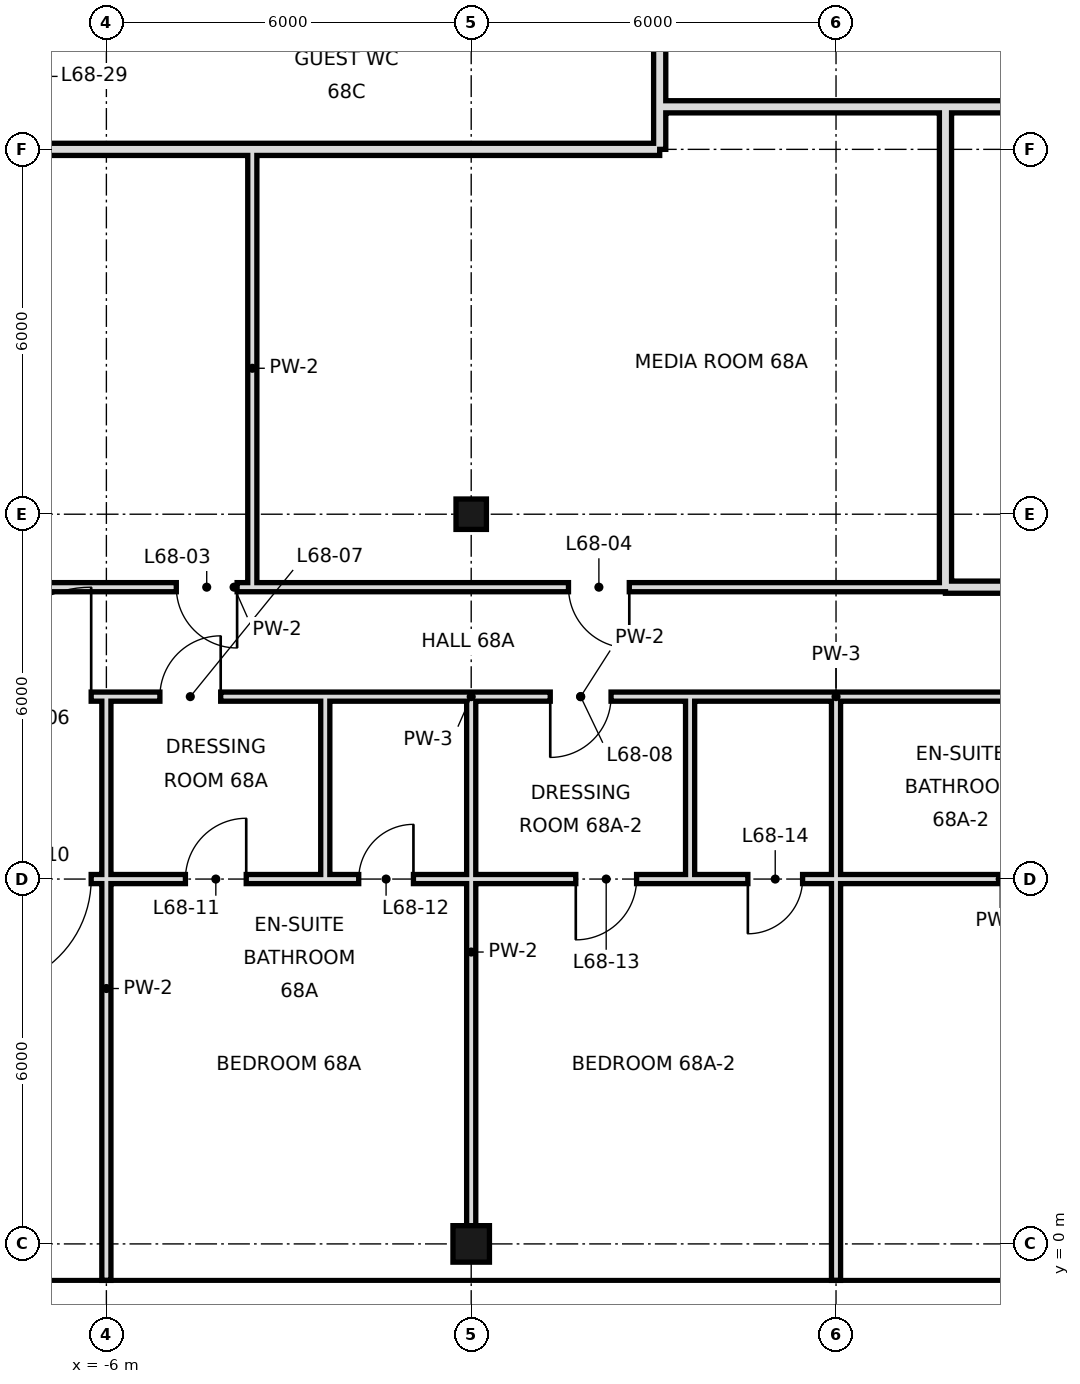
"""IFC4 building model, lengths in metres.
Left out: names, types, materials, properties, quantities, classifications, styles, units other than length and angle.
Written with IfcOpenShell. Run it as: python <this file> out.ifc"""

import sys

from ifc_helpers import new_model, si_unit, direction, frame, frame_2d, origin, origin_with_axes, origin_2d, place, context, subcontext, project, spatial, rectangle, hollow_rectangle, extrude, element, fill, save


model = new_model("IFC4")
c1 = context("Model", 3, precision=1e-05, world=origin(), true_north=direction((0.0, 1.0)))
c2 = subcontext(c1, "Body", "Model", "MODEL_VIEW")
j1 = project(units=[si_unit("LENGTHUNIT", "METRE"), si_unit("PLANEANGLEUNIT", "RADIAN")], contexts=[c1])
p1 = place(None, origin())
s1 = spatial("IfcSite", under=j1, at=p1, CompositionType="ELEMENT")
p2 = place(p1, origin())
s2 = spatial("IfcBuilding", under=s1, at=p2, CompositionType="ELEMENT")
p3 = place(p2, frame((0.0, 0.0, 290.8)))
s3 = spatial("IfcBuildingStorey", under=s2, at=p3, CompositionType="ELEMENT", Elevation=290.8)
p4 = place(p3, origin_with_axes())
e1 = element("IfcColumn", 1, at=p4, inside=s3, PredefinedType="COLUMN", context=c2, shape_type="SweptSolid", body=[
    extrude(hollow_rectangle(XDim=0.6, YDim=0.6, WallThickness=0.028, at=origin_2d()), origin(), (0.0, 0.0, 1.0), 3.6),
])
p5 = place(p3, frame((0.0, 12.0, 0.0), z_axis=(0.0, 0.0, 1.0), x_axis=(1.0, 0.0, 0.0)))
e2 = element("IfcColumn", 2, at=p5, inside=s3, PredefinedType="COLUMN", context=c2, shape_type="SweptSolid", body=[
    extrude(hollow_rectangle(XDim=0.5, YDim=0.5, WallThickness=0.025, at=origin_2d()), origin(), (0.0, 0.0, 1.0), 3.6),
])
p6 = place(p3, frame((-2.4, 6.0, 0.0), z_axis=(0.0, 0.0, 1.0), x_axis=(0.0, 1.0, 0.0)))
e3 = element("IfcWall", 3, at=p6, inside=s3, PredefinedType="PARTITIONING", context=c2, shape_type="SweptSolid", body=[
    extrude(rectangle(XDim=3.0, YDim=0.15, at=frame_2d((1.5, 0.0))), origin(), (0.0, 0.0, 1.0), 3.42),
])
p7 = place(p3, frame((-3.6, 10.8, 0.0), z_axis=(0.0, 0.0, 1.0), x_axis=(0.0, 1.0, 0.0)))
e4 = element("IfcWall", 4, at=p7, inside=s3, PredefinedType="PARTITIONING", context=c2, shape_type="SweptSolid", body=[
    extrude(rectangle(XDim=7.2, YDim=0.15, at=frame_2d((3.6, 0.0))), origin(), (0.0, 0.0, 1.0), 3.42),
])
p8 = place(p3, frame((-6.0, -0.6, 0.0), z_axis=(0.0, 0.0, 1.0), x_axis=(0.0, 1.0, 0.0)))
e5 = element("IfcWall", 5, at=p8, inside=s3, PredefinedType="PARTITIONING", context=c2, shape_type="SweptSolid", body=[
    extrude(rectangle(XDim=9.6, YDim=0.15, at=frame_2d((4.8, 0.0))), origin(), (0.0, 0.0, 1.0), 3.42),
])
p9 = place(p3, frame((0.0, 0.0, 0.0), z_axis=(0.0, 0.0, 1.0), x_axis=(0.0, 1.0, 0.0)))
e6 = element("IfcWall", 6, at=p9, inside=s3, PredefinedType="PARTITIONING", context=c2, shape_type="SweptSolid", body=[
    extrude(rectangle(XDim=6.0, YDim=0.15, at=frame_2d((3.0, 0.0))), origin(), (0.0, 0.0, 1.0), 2.72),
])
p10 = place(p3, frame((0.0, 6.0, 0.0), z_axis=(0.0, 0.0, 1.0), x_axis=(0.0, 1.0, 0.0)))
e7 = element("IfcWall", 7, at=p10, inside=s3, PredefinedType="PARTITIONING", context=c2, shape_type="SweptSolid", body=[
    extrude(rectangle(XDim=3.0, YDim=0.15, at=frame_2d((1.5, 0.0))), origin(), (0.0, 0.0, 1.0), 2.72),
])
p11 = place(p3, frame((3.1, 18.7, 0.0), z_axis=(0.0, 0.0, 1.0), x_axis=(0.0, 1.0, 0.0)))
e8 = element("IfcWall", 8, at=p11, inside=s3, PredefinedType="SOLIDWALL", context=c2, shape_type="SweptSolid", body=[
    extrude(rectangle(XDim=25.1, YDim=0.2, at=frame_2d((12.55, 0.0))), origin(), (0.0, 0.0, 1.0), 2.97),
])
p12 = place(p11, frame((3.28, 0.0, 0.0)))
e9 = element("IfcOpeningElement", 9, at=p12, cuts=e8, PredefinedType="OPENING", context=c2, shape_type="SweptSolid", body=[
    extrude(rectangle(XDim=1.2, YDim=2.4, at=frame_2d((0.6, 1.2))), frame((0.0, 0.11, 0.0), z_axis=(0.0, -1.0, 0.0), x_axis=(1.0, 0.0, 0.0)), (0.0, 0.0, 1.0), 0.22),
])
p13 = place(p3, frame((3.1, 18.0, 0.0), z_axis=(0.0, 0.0, 1.0), x_axis=(0.0, 1.0, 0.0)))
e10 = element("IfcWall", 10, at=p13, inside=s3, PredefinedType="SOLIDWALL", context=c2, shape_type="SweptSolid", body=[
    extrude(rectangle(XDim=0.7, YDim=0.2, at=frame_2d((0.35, 0.0))), origin(), (0.0, 0.0, 1.0), 2.97),
])
p14 = place(p3, frame((3.6, 6.0, 0.0), z_axis=(0.0, 0.0, 1.0), x_axis=(0.0, 1.0, 0.0)))
e11 = element("IfcWall", 11, at=p14, inside=s3, PredefinedType="PARTITIONING", context=c2, shape_type="SweptSolid", body=[
    extrude(rectangle(XDim=3.0, YDim=0.15, at=frame_2d((1.5, 0.0))), origin(), (0.0, 0.0, 1.0), 3.42),
])
p15 = place(p3, frame((6.0, -0.6, 0.0), z_axis=(0.0, 0.0, 1.0), x_axis=(0.0, 1.0, 0.0)))
e12 = element("IfcWall", 12, at=p15, inside=s3, PredefinedType="PARTITIONING", context=c2, shape_type="SweptSolid", body=[
    extrude(rectangle(XDim=6.6, YDim=0.15, at=frame_2d((3.3, 0.0))), origin(), (0.0, 0.0, 1.0), 2.72),
])
p16 = place(p3, frame((6.0, 6.0, 0.0), z_axis=(0.0, 0.0, 1.0), x_axis=(0.0, 1.0, 0.0)))
e13 = element("IfcWall", 13, at=p16, inside=s3, PredefinedType="PARTITIONING", context=c2, shape_type="SweptSolid", body=[
    extrude(rectangle(XDim=3.0, YDim=0.15, at=frame_2d((1.5, 0.0))), origin(), (0.0, 0.0, 1.0), 2.72),
])
p17 = place(p3, frame((7.8, 10.8, 0.0), z_axis=(0.0, 0.0, 1.0), x_axis=(0.0, 1.0, 0.0)))
e14 = element("IfcWall", 14, at=p17, inside=s3, PredefinedType="SOLIDWALL", context=c2, shape_type="SweptSolid", body=[
    extrude(rectangle(XDim=7.9, YDim=0.2, at=frame_2d((3.95, 0.0))), origin(), (0.0, 0.0, 1.0), 2.72),
])
p18 = place(p3, frame((7.8, 10.8, 0.0), z_axis=(0.0, 0.0, 1.0), x_axis=(1.0, 0.0, 0.0)))
e15 = element("IfcWall", 15, at=p18, inside=s3, PredefinedType="SOLIDWALL", context=c2, shape_type="SweptSolid", body=[
    extrude(rectangle(XDim=5.4, YDim=0.2, at=frame_2d((2.7, 0.0))), origin(), (0.0, 0.0, 1.0), 2.72),
])
p19 = place(p18, frame((1.42, 0.0, 0.0)))
e16 = element("IfcOpeningElement", 16, at=p19, cuts=e15, PredefinedType="OPENING", context=c2, shape_type="SweptSolid", body=[
    extrude(rectangle(XDim=1.0, YDim=2.4, at=frame_2d((0.5, 1.2))), frame((0.0, 0.11, 0.0), z_axis=(0.0, -1.0, 0.0), x_axis=(1.0, 0.0, 0.0)), (0.0, 0.0, 1.0), 0.22),
])
p20 = place(p3, frame((-15.6, 10.8, 0.0), z_axis=(0.0, 0.0, 1.0), x_axis=(1.0, 0.0, 0.0)))
e17 = element("IfcWall", 17, at=p20, inside=s3, PredefinedType="PARTITIONING", context=c2, shape_type="SweptSolid", body=[
    extrude(rectangle(XDim=23.4, YDim=0.15, at=frame_2d((11.7, 0.0))), origin(), (0.0, 0.0, 1.0), 3.42),
])
p21 = place(p20, frame((10.75, 0.0, 0.0)))
e18 = element("IfcOpeningElement", 18, at=p21, cuts=e17, PredefinedType="OPENING", context=c2, shape_type="SweptSolid", body=[
    extrude(rectangle(XDim=1.0, YDim=2.4, at=frame_2d((0.5, 1.2))), frame((0.0, 0.085, 0.0), z_axis=(0.0, -1.0, 0.0), x_axis=(1.0, 0.0, 0.0)), (0.0, 0.0, 1.0), 0.17),
])
p22 = place(p20, frame((17.2, 0.0, 0.0)))
e19 = element("IfcOpeningElement", 19, at=p22, cuts=e17, PredefinedType="OPENING", context=c2, shape_type="SweptSolid", body=[
    extrude(rectangle(XDim=1.0, YDim=2.4, at=frame_2d((0.5, 1.2))), frame((0.0, 0.085, 0.0), z_axis=(0.0, -1.0, 0.0), x_axis=(1.0, 0.0, 0.0)), (0.0, 0.0, 1.0), 0.17),
])
p23 = place(p3, frame((-18.6, 18.0, 0.0), z_axis=(0.0, 0.0, 1.0), x_axis=(1.0, 0.0, 0.0)))
e20 = element("IfcWall", 20, at=p23, inside=s3, PredefinedType="SOLIDWALL", context=c2, shape_type="SweptSolid", body=[
    extrude(rectangle(XDim=21.7, YDim=0.2, at=frame_2d((10.85, 0.0))), origin(), (0.0, 0.0, 1.0), 2.72),
])
p24 = place(p3, frame((3.1, 18.7, 0.0), z_axis=(0.0, 0.0, 1.0), x_axis=(1.0, 0.0, 0.0)))
e21 = element("IfcWall", 21, at=p24, inside=s3, PredefinedType="SOLIDWALL", context=c2, shape_type="SweptSolid", body=[
    extrude(rectangle(XDim=4.7, YDim=0.2, at=frame_2d((2.35, 0.0))), origin(), (0.0, 0.0, 1.0), 2.72),
])
p25 = place(p3, frame((7.8, 18.7, 0.0), z_axis=(0.0, 0.0, 1.0), x_axis=(1.0, 0.0, 0.0)))
e22 = element("IfcWall", 22, at=p25, inside=s3, PredefinedType="SOLIDWALL", context=c2, shape_type="SweptSolid", body=[
    extrude(rectangle(XDim=5.4, YDim=0.2, at=frame_2d((2.7, 0.0))), origin(), (0.0, 0.0, 1.0), 3.42),
])
p26 = place(p3, frame((-18.0, 6.0, 0.0), z_axis=(0.0, 0.0, 1.0), x_axis=(1.0, 0.0, 0.0)))
e23 = element("IfcWall", 23, at=p26, inside=s3, PredefinedType="PARTITIONING", context=c2, shape_type="SweptSolid", body=[
    extrude(rectangle(XDim=15.6, YDim=0.15, at=frame_2d((7.8, 0.0))), origin(), (0.0, 0.0, 1.0), 2.72),
])
p27 = place(p26, frame((9.95, 0.0, 0.0)))
e24 = element("IfcOpeningElement", 24, at=p27, cuts=e23, PredefinedType="OPENING", context=c2, shape_type="SweptSolid", body=[
    extrude(rectangle(XDim=1.8, YDim=2.4, at=frame_2d((0.9, 1.2))), frame((0.0, 0.085, 0.0), z_axis=(0.0, -1.0, 0.0), x_axis=(1.0, 0.0, 0.0)), (0.0, 0.0, 1.0), 0.17),
])
p28 = place(p26, frame((13.3, 0.0, 0.0)))
e25 = element("IfcOpeningElement", 25, at=p28, cuts=e23, PredefinedType="OPENING", context=c2, shape_type="SweptSolid", body=[
    extrude(rectangle(XDim=1.0, YDim=2.4, at=frame_2d((0.5, 1.2))), frame((0.0, 0.085, 0.0), z_axis=(0.0, -1.0, 0.0), x_axis=(1.0, 0.0, 0.0)), (0.0, 0.0, 1.0), 0.17),
])
p29 = place(p3, frame((0.0, 6.0, 0.0), z_axis=(0.0, 0.0, 1.0), x_axis=(1.0, 0.0, 0.0)))
e26 = element("IfcWall", 26, at=p29, inside=s3, PredefinedType="PARTITIONING", context=c2, shape_type="SweptSolid", body=[
    extrude(rectangle(XDim=3.6, YDim=0.15, at=frame_2d((1.8, 0.0))), origin(), (0.0, 0.0, 1.0), 2.97),
])
p30 = place(p29, frame((1.72, 0.0, 0.0)))
e27 = element("IfcOpeningElement", 27, at=p30, cuts=e26, PredefinedType="OPENING", context=c2, shape_type="SweptSolid", body=[
    extrude(rectangle(XDim=1.0, YDim=2.4, at=frame_2d((0.5, 1.2))), frame((0.0, 0.085, 0.0), z_axis=(0.0, -1.0, 0.0), x_axis=(1.0, 0.0, 0.0)), (0.0, 0.0, 1.0), 0.17),
])
p31 = place(p3, frame((6.0, 6.0, 0.0), z_axis=(0.0, 0.0, 1.0), x_axis=(1.0, 0.0, 0.0)))
e28 = element("IfcWall", 28, at=p31, inside=s3, PredefinedType="PARTITIONING", context=c2, shape_type="SweptSolid", body=[
    extrude(rectangle(XDim=12.0, YDim=0.15, at=frame_2d((6.0, 0.0))), origin(), (0.0, 0.0, 1.0), 2.97),
])
p32 = place(p31, frame((5.1, 0.0, 0.0)))
e29 = element("IfcOpeningElement", 29, at=p32, cuts=e28, PredefinedType="OPENING", context=c2, shape_type="SweptSolid", body=[
    extrude(rectangle(XDim=1.8, YDim=2.4, at=frame_2d((0.9, 1.2))), frame((0.0, 0.085, 0.0), z_axis=(0.0, -1.0, 0.0), x_axis=(1.0, 0.0, 0.0)), (0.0, 0.0, 1.0), 0.17),
])
p33 = place(p3, frame((-2.4, 6.0, 0.0), z_axis=(0.0, 0.0, 1.0), x_axis=(1.0, 0.0, 0.0)))
e30 = element("IfcWall", 30, at=p33, inside=s3, PredefinedType="PARTITIONING", context=c2, shape_type="SweptSolid", body=[
    extrude(rectangle(XDim=2.4, YDim=0.15, at=frame_2d((1.2, 0.0))), origin(), (0.0, 0.0, 1.0), 2.72),
])
p34 = place(p33, frame((0.55, 0.0, 0.0)))
e31 = element("IfcOpeningElement", 31, at=p34, cuts=e30, PredefinedType="OPENING", context=c2, shape_type="SweptSolid", body=[
    extrude(rectangle(XDim=0.9, YDim=2.4, at=frame_2d((0.45, 1.2))), frame((0.0, 0.085, 0.0), z_axis=(0.0, -1.0, 0.0), x_axis=(1.0, 0.0, 0.0)), (0.0, 0.0, 1.0), 0.17),
])
p35 = place(p3, frame((3.6, 6.0, 0.0), z_axis=(0.0, 0.0, 1.0), x_axis=(1.0, 0.0, 0.0)))
e32 = element("IfcWall", 32, at=p35, inside=s3, PredefinedType="PARTITIONING", context=c2, shape_type="SweptSolid", body=[
    extrude(rectangle(XDim=2.4, YDim=0.15, at=frame_2d((1.2, 0.0))), origin(), (0.0, 0.0, 1.0), 2.97),
])
p36 = place(p35, frame((0.95, 0.0, 0.0)))
e33 = element("IfcOpeningElement", 33, at=p36, cuts=e32, PredefinedType="OPENING", context=c2, shape_type="SweptSolid", body=[
    extrude(rectangle(XDim=0.9, YDim=2.4, at=frame_2d((0.45, 1.2))), frame((0.0, 0.085, 0.0), z_axis=(0.0, -1.0, 0.0), x_axis=(1.0, 0.0, 0.0)), (0.0, 0.0, 1.0), 0.17),
])
p37 = place(p3, frame((-18.6, 9.0, 0.0), z_axis=(0.0, 0.0, 1.0), x_axis=(1.0, 0.0, 0.0)))
e34 = element("IfcWall", 34, at=p37, inside=s3, PredefinedType="PARTITIONING", context=c2, shape_type="SweptSolid", body=[
    extrude(rectangle(XDim=16.2, YDim=0.15, at=frame_2d((8.1, 0.0))), origin(), (0.0, 0.0, 1.0), 3.42),
])
p38 = place(p37, frame((10.55, 0.0, 0.0)))
e35 = element("IfcOpeningElement", 35, at=p38, cuts=e34, PredefinedType="OPENING", context=c2, shape_type="SweptSolid", body=[
    extrude(rectangle(XDim=1.8, YDim=2.4, at=frame_2d((0.9, 1.2))), frame((0.0, 0.085, 0.0), z_axis=(0.0, -1.0, 0.0), x_axis=(1.0, 0.0, 0.0)), (0.0, 0.0, 1.0), 0.17),
])
p39 = place(p37, frame((13.48, 0.0, 0.0)))
e36 = element("IfcOpeningElement", 36, at=p39, cuts=e34, PredefinedType="OPENING", context=c2, shape_type="SweptSolid", body=[
    extrude(rectangle(XDim=1.0, YDim=2.4, at=frame_2d((0.5, 1.2))), frame((0.0, 0.085, 0.0), z_axis=(0.0, -1.0, 0.0), x_axis=(1.0, 0.0, 0.0)), (0.0, 0.0, 1.0), 0.17),
])
p40 = place(p3, frame((0.0, 9.0, 0.0), z_axis=(0.0, 0.0, 1.0), x_axis=(1.0, 0.0, 0.0)))
e37 = element("IfcWall", 37, at=p40, inside=s3, PredefinedType="PARTITIONING", context=c2, shape_type="SweptSolid", body=[
    extrude(rectangle(XDim=3.6, YDim=0.15, at=frame_2d((1.8, 0.0))), origin(), (0.0, 0.0, 1.0), 3.42),
])
p41 = place(p40, frame((1.3, 0.0, 0.0)))
e38 = element("IfcOpeningElement", 38, at=p41, cuts=e37, PredefinedType="OPENING", context=c2, shape_type="SweptSolid", body=[
    extrude(rectangle(XDim=1.0, YDim=2.4, at=frame_2d((0.5, 1.2))), frame((0.0, 0.085, 0.0), z_axis=(0.0, -1.0, 0.0), x_axis=(1.0, 0.0, 0.0)), (0.0, 0.0, 1.0), 0.17),
])
p42 = place(p3, frame((6.0, 9.0, 0.0), z_axis=(0.0, 0.0, 1.0), x_axis=(1.0, 0.0, 0.0)))
e39 = element("IfcWall", 39, at=p42, inside=s3, PredefinedType="PARTITIONING", context=c2, shape_type="SweptSolid", body=[
    extrude(rectangle(XDim=12.0, YDim=0.15, at=frame_2d((6.0, 0.0))), origin(), (0.0, 0.0, 1.0), 3.42),
])
p43 = place(p42, frame((5.1, 0.0, 0.0)))
e40 = element("IfcOpeningElement", 40, at=p43, cuts=e39, PredefinedType="OPENING", context=c2, shape_type="SweptSolid", body=[
    extrude(rectangle(XDim=1.8, YDim=2.4, at=frame_2d((0.9, 1.2))), frame((0.0, 0.085, 0.0), z_axis=(0.0, -1.0, 0.0), x_axis=(1.0, 0.0, 0.0)), (0.0, 0.0, 1.0), 0.17),
])
for number, where, z_axis, x_axis in (
    (41, (-2.4, 9.0, 0.0), (0.0, 0.0, 1.0), (1.0, 0.0, 0.0)),
    (42, (3.6, 9.0, 0.0), (0.0, 0.0, 1.0), (1.0, 0.0, 0.0)),
):
    element("IfcWall", number, at=place(p3, frame(where, z_axis=z_axis, x_axis=x_axis)), inside=s3, PredefinedType="PARTITIONING", context=c2, shape_type="SweptSolid", body=[
        extrude(rectangle(XDim=2.4, YDim=0.15, at=frame_2d((1.2, 0.0))), origin(), (0.0, 0.0, 1.0), 3.42),
    ])
p44 = place(p21, origin())
e43 = element("IfcDoor", 43, at=p44, inside=s3, OperationType="SINGLE_SWING_RIGHT", PredefinedType="DOOR", context=c2, shape_type="SweptSolid", body=[
    extrude(rectangle(XDim=1.0, YDim=2.4, at=frame_2d((0.5, 1.2))), frame((0.0, 0.025, 0.0), z_axis=(0.0, -1.0, 0.0), x_axis=(1.0, 0.0, 0.0)), (0.0, 0.0, 1.0), 0.05),
])
fill(e18, e43)
p45 = place(p22, origin())
e44 = element("IfcDoor", 44, at=p45, inside=s3, OperationType="SINGLE_SWING_RIGHT", PredefinedType="DOOR", context=c2, shape_type="SweptSolid", body=[
    extrude(rectangle(XDim=1.0, YDim=2.4, at=frame_2d((0.5, 1.2))), frame((0.0, 0.025, 0.0), z_axis=(0.0, -1.0, 0.0), x_axis=(1.0, 0.0, 0.0)), (0.0, 0.0, 1.0), 0.05),
])
fill(e19, e44)
p46 = place(p38, frame((1.8, 0.0, 0.0), z_axis=(0.0, 0.0, 1.0), x_axis=(-1.0, 0.0, 0.0)))
e45 = element("IfcDoor", 45, at=p46, inside=s3, OperationType="SINGLE_SWING_LEFT", PredefinedType="DOOR", context=c2, shape_type="SweptSolid", body=[
    extrude(rectangle(XDim=1.8, YDim=2.4, at=frame_2d((0.9, 1.2))), frame((0.0, 0.025, 0.0), z_axis=(0.0, -1.0, 0.0), x_axis=(1.0, 0.0, 0.0)), (0.0, 0.0, 1.0), 0.05),
])
fill(e35, e45)
p47 = place(p39, frame((1.0, 0.0, 0.0), z_axis=(0.0, 0.0, 1.0), x_axis=(-1.0, 0.0, 0.0)))
e46 = element("IfcDoor", 46, at=p47, inside=s3, OperationType="SINGLE_SWING_LEFT", PredefinedType="DOOR", context=c2, shape_type="SweptSolid", body=[
    extrude(rectangle(XDim=1.0, YDim=2.4, at=frame_2d((0.5, 1.2))), frame((0.0, 0.025, 0.0), z_axis=(0.0, -1.0, 0.0), x_axis=(1.0, 0.0, 0.0)), (0.0, 0.0, 1.0), 0.05),
])
fill(e36, e46)
p48 = place(p41, frame((1.0, 0.0, 0.0), z_axis=(0.0, 0.0, 1.0), x_axis=(-1.0, 0.0, 0.0)))
e47 = element("IfcDoor", 47, at=p48, inside=s3, OperationType="SINGLE_SWING_RIGHT", PredefinedType="DOOR", context=c2, shape_type="SweptSolid", body=[
    extrude(rectangle(XDim=1.0, YDim=2.4, at=frame_2d((0.5, 1.2))), frame((0.0, 0.025, 0.0), z_axis=(0.0, -1.0, 0.0), x_axis=(1.0, 0.0, 0.0)), (0.0, 0.0, 1.0), 0.05),
])
fill(e38, e47)
p49 = place(p27, frame((1.8, 0.0, 0.0), z_axis=(0.0, 0.0, 1.0), x_axis=(-1.0, 0.0, 0.0)))
e48 = element("IfcDoor", 48, at=p49, inside=s3, OperationType="SINGLE_SWING_RIGHT", PredefinedType="DOOR", context=c2, shape_type="SweptSolid", body=[
    extrude(rectangle(XDim=1.8, YDim=2.4, at=frame_2d((0.9, 1.2))), frame((0.0, 0.025, 0.0), z_axis=(0.0, -1.0, 0.0), x_axis=(1.0, 0.0, 0.0)), (0.0, 0.0, 1.0), 0.05),
])
fill(e24, e48)
p50 = place(p28, frame((1.0, 0.0, 0.0), z_axis=(0.0, 0.0, 1.0), x_axis=(-1.0, 0.0, 0.0)))
e49 = element("IfcDoor", 49, at=p50, inside=s3, OperationType="SINGLE_SWING_LEFT", PredefinedType="DOOR", context=c2, shape_type="SweptSolid", body=[
    extrude(rectangle(XDim=1.0, YDim=2.4, at=frame_2d((0.5, 1.2))), frame((0.0, 0.025, 0.0), z_axis=(0.0, -1.0, 0.0), x_axis=(1.0, 0.0, 0.0)), (0.0, 0.0, 1.0), 0.05),
])
fill(e25, e49)
p51 = place(p34, frame((0.9, 0.0, 0.0), z_axis=(0.0, 0.0, 1.0), x_axis=(-1.0, 0.0, 0.0)))
e50 = element("IfcDoor", 50, at=p51, inside=s3, OperationType="SINGLE_SWING_LEFT", PredefinedType="DOOR", context=c2, shape_type="SweptSolid", body=[
    extrude(rectangle(XDim=0.9, YDim=2.4, at=frame_2d((0.45, 1.2))), frame((0.0, 0.025, 0.0), z_axis=(0.0, -1.0, 0.0), x_axis=(1.0, 0.0, 0.0)), (0.0, 0.0, 1.0), 0.05),
])
fill(e31, e50)
p52 = place(p30, frame((1.0, 0.0, 0.0), z_axis=(0.0, 0.0, 1.0), x_axis=(-1.0, 0.0, 0.0)))
e51 = element("IfcDoor", 51, at=p52, inside=s3, OperationType="SINGLE_SWING_RIGHT", PredefinedType="DOOR", context=c2, shape_type="SweptSolid", body=[
    extrude(rectangle(XDim=1.0, YDim=2.4, at=frame_2d((0.5, 1.2))), frame((0.0, 0.025, 0.0), z_axis=(0.0, -1.0, 0.0), x_axis=(1.0, 0.0, 0.0)), (0.0, 0.0, 1.0), 0.05),
])
fill(e27, e51)
p53 = place(p36, frame((0.9, 0.0, 0.0), z_axis=(0.0, 0.0, 1.0), x_axis=(-1.0, 0.0, 0.0)))
e52 = element("IfcDoor", 52, at=p53, inside=s3, OperationType="SINGLE_SWING_RIGHT", PredefinedType="DOOR", context=c2, shape_type="SweptSolid", body=[
    extrude(rectangle(XDim=0.9, YDim=2.4, at=frame_2d((0.45, 1.2))), frame((0.0, 0.025, 0.0), z_axis=(0.0, -1.0, 0.0), x_axis=(1.0, 0.0, 0.0)), (0.0, 0.0, 1.0), 0.05),
])
fill(e33, e52)
save(model, sys.argv[1])
